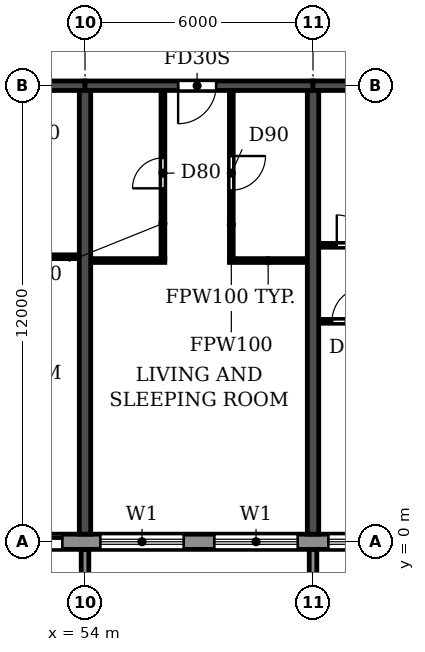
"""IFC4 building model, lengths in metres.
Left out: names, types, materials, properties, quantities, classifications, styles, units other than length and angle.
Written with IfcOpenShell. Run it as: python <this file> out.ifc"""

import sys

from ifc_helpers import new_model, si_unit, direction, frame, frame_2d, origin, place, context, subcontext, project, spatial, polyline, rectangle, outline, extrude, source, transform, mapped, element, fill, save


model = new_model("IFC4")
c1 = context("Model", 3, precision=1e-05, world=origin(), true_north=direction((0.0, 1.0)))
c2 = subcontext(c1, "Body", "Model", "MODEL_VIEW")
j1 = project(units=[si_unit("LENGTHUNIT", "METRE"), si_unit("PLANEANGLEUNIT", "RADIAN")], contexts=[c1])
p1 = place(None, origin())
s1 = spatial("IfcSite", under=j1, at=p1, CompositionType="ELEMENT")
p2 = place(p1, origin())
s2 = spatial("IfcBuilding", under=s1, at=p2, CompositionType="ELEMENT")
p3 = place(p2, frame((0.0, 0.0, 142.2)))
s3 = spatial("IfcBuildingStorey", under=s2, at=p3, CompositionType="ELEMENT", Elevation=142.2)
for number, where, z_axis, x_axis in (
    (1, (54.0, 0.2, 0.0), (0.0, 0.0, 1.0), (0.0, 1.0, 0.0)),
    (2, (60.0, 0.2, 0.0), (0.0, 0.0, 1.0), (0.0, 1.0, 0.0)),
):
    element("IfcWall", number, at=place(p3, frame(where, z_axis=z_axis, x_axis=x_axis)), inside=s3, PredefinedType="SHEAR", context=c2, shape_type="SweptSolid", body=[
        extrude(rectangle(XDim=11.675, YDim=0.3, at=frame_2d((5.837, 0.0))), origin(), (0.0, 0.0, 1.0), 3.07),
    ])
p4 = place(p3, frame((48.0, 12.0, 0.0), z_axis=(0.0, 0.0, 1.0), x_axis=(1.0, 0.0, 0.0)))
e3 = element("IfcWall", 3, at=p4, inside=s3, PredefinedType="SHEAR", context=c2, shape_type="SweptSolid", body=[
    extrude(rectangle(XDim=6.0, YDim=0.25, at=frame_2d((3.0, 0.0))), origin(), (0.0, 0.0, 1.0), 2.47),
])
p5 = place(p4, frame((2.45, 0.0, 0.0)))
e4 = element("IfcOpeningElement", 4, at=p5, cuts=e3, PredefinedType="OPENING", context=c2, shape_type="SweptSolid", body=[
    extrude(rectangle(XDim=1.0, YDim=2.1, at=frame_2d((0.5, 1.05))), frame((0.0, 0.135, 0.0), z_axis=(0.0, -1.0, 0.0), x_axis=(1.0, 0.0, 0.0)), (0.0, 0.0, 1.0), 0.27),
])
p6 = place(p3, frame((54.0, 12.0, 0.0), z_axis=(0.0, 0.0, 1.0), x_axis=(1.0, 0.0, 0.0)))
e5 = element("IfcWall", 5, at=p6, inside=s3, PredefinedType="SHEAR", context=c2, shape_type="SweptSolid", body=[
    extrude(rectangle(XDim=6.0, YDim=0.25, at=frame_2d((3.0, 0.0))), origin(), (0.0, 0.0, 1.0), 2.47),
])
p7 = place(p6, frame((2.45, 0.0, 0.0)))
e6 = element("IfcOpeningElement", 6, at=p7, cuts=e5, PredefinedType="OPENING", context=c2, shape_type="SweptSolid", body=[
    extrude(rectangle(XDim=1.0, YDim=2.1, at=frame_2d((0.5, 1.05))), frame((0.0, 0.135, 0.0), z_axis=(0.0, -1.0, 0.0), x_axis=(1.0, 0.0, 0.0)), (0.0, 0.0, 1.0), 0.27),
])
p8 = place(p3, frame((60.0, 12.0, 0.0), z_axis=(0.0, 0.0, 1.0), x_axis=(1.0, 0.0, 0.0)))
e7 = element("IfcWall", 7, at=p8, inside=s3, PredefinedType="SHEAR", context=c2, shape_type="SweptSolid", body=[
    extrude(rectangle(XDim=6.0, YDim=0.25, at=frame_2d((3.0, 0.0))), origin(), (0.0, 0.0, 1.0), 2.47),
])
p9 = place(p8, frame((2.45, 0.0, 0.0)))
e8 = element("IfcOpeningElement", 8, at=p9, cuts=e7, PredefinedType="OPENING", context=c2, shape_type="SweptSolid", body=[
    extrude(rectangle(XDim=1.0, YDim=2.1, at=frame_2d((0.5, 1.05))), frame((0.0, 0.135, 0.0), z_axis=(0.0, -1.0, 0.0), x_axis=(1.0, 0.0, 0.0)), (0.0, 0.0, 1.0), 0.27),
])
p10 = place(p3, frame((16.683, 0.0, 0.0), z_axis=(0.0, 0.0, 1.0), x_axis=(1.0, 0.0, 0.0)))
e9 = element("IfcWall", 9, at=p10, inside=s3, PredefinedType="STANDARD", context=c2, shape_type="SweptSolid", body=[
    extrude(rectangle(XDim=68.634, YDim=0.4, at=frame_2d((34.317, 0.0))), origin(), (0.0, 0.0, 1.0), 3.07),
])
p11 = place(p10, frame((1.717, 0.0, 0.9)))
e10 = element("IfcOpeningElement", 10, at=p11, cuts=e9, PredefinedType="OPENING", context=c2, shape_type="SweptSolid", body=[
    extrude(rectangle(XDim=2.2, YDim=1.5, at=frame_2d((1.1, 0.75))), frame((0.0, 0.21, 0.0), z_axis=(0.0, -1.0, 0.0), x_axis=(1.0, 0.0, 0.0)), (0.0, 0.0, 1.0), 0.42),
])
p12 = place(p10, frame((4.717, 0.0, 0.9)))
e11 = element("IfcOpeningElement", 11, at=p12, cuts=e9, PredefinedType="OPENING", context=c2, shape_type="SweptSolid", body=[
    extrude(rectangle(XDim=2.2, YDim=1.5, at=frame_2d((1.1, 0.75))), frame((0.0, 0.21, 0.0), z_axis=(0.0, -1.0, 0.0), x_axis=(1.0, 0.0, 0.0)), (0.0, 0.0, 1.0), 0.42),
])
p13 = place(p10, frame((7.717, 0.0, 0.9)))
e12 = element("IfcOpeningElement", 12, at=p13, cuts=e9, PredefinedType="OPENING", context=c2, shape_type="SweptSolid", body=[
    extrude(rectangle(XDim=2.2, YDim=1.5, at=frame_2d((1.1, 0.75))), frame((0.0, 0.21, 0.0), z_axis=(0.0, -1.0, 0.0), x_axis=(1.0, 0.0, 0.0)), (0.0, 0.0, 1.0), 0.42),
])
p14 = place(p10, frame((10.717, 0.0, 0.9)))
e13 = element("IfcOpeningElement", 13, at=p14, cuts=e9, PredefinedType="OPENING", context=c2, shape_type="SweptSolid", body=[
    extrude(rectangle(XDim=2.2, YDim=1.5, at=frame_2d((1.1, 0.75))), frame((0.0, 0.21, 0.0), z_axis=(0.0, -1.0, 0.0), x_axis=(1.0, 0.0, 0.0)), (0.0, 0.0, 1.0), 0.42),
])
p15 = place(p10, frame((13.717, 0.0, 0.9)))
e14 = element("IfcOpeningElement", 14, at=p15, cuts=e9, PredefinedType="OPENING", context=c2, shape_type="SweptSolid", body=[
    extrude(rectangle(XDim=2.2, YDim=1.5, at=frame_2d((1.1, 0.75))), frame((0.0, 0.21, 0.0), z_axis=(0.0, -1.0, 0.0), x_axis=(1.0, 0.0, 0.0)), (0.0, 0.0, 1.0), 0.42),
])
p16 = place(p10, frame((16.717, 0.0, 0.9)))
e15 = element("IfcOpeningElement", 15, at=p16, cuts=e9, PredefinedType="OPENING", context=c2, shape_type="SweptSolid", body=[
    extrude(rectangle(XDim=2.2, YDim=1.5, at=frame_2d((1.1, 0.75))), frame((0.0, 0.21, 0.0), z_axis=(0.0, -1.0, 0.0), x_axis=(1.0, 0.0, 0.0)), (0.0, 0.0, 1.0), 0.42),
])
p17 = place(p10, frame((19.717, 0.0, 0.9)))
e16 = element("IfcOpeningElement", 16, at=p17, cuts=e9, PredefinedType="OPENING", context=c2, shape_type="SweptSolid", body=[
    extrude(rectangle(XDim=2.2, YDim=1.5, at=frame_2d((1.1, 0.75))), frame((0.0, 0.21, 0.0), z_axis=(0.0, -1.0, 0.0), x_axis=(1.0, 0.0, 0.0)), (0.0, 0.0, 1.0), 0.42),
])
p18 = place(p10, frame((22.717, 0.0, 0.9)))
e17 = element("IfcOpeningElement", 17, at=p18, cuts=e9, PredefinedType="OPENING", context=c2, shape_type="SweptSolid", body=[
    extrude(rectangle(XDim=2.2, YDim=1.5, at=frame_2d((1.1, 0.75))), frame((0.0, 0.21, 0.0), z_axis=(0.0, -1.0, 0.0), x_axis=(1.0, 0.0, 0.0)), (0.0, 0.0, 1.0), 0.42),
])
p19 = place(p10, frame((25.717, 0.0, 0.9)))
e18 = element("IfcOpeningElement", 18, at=p19, cuts=e9, PredefinedType="OPENING", context=c2, shape_type="SweptSolid", body=[
    extrude(rectangle(XDim=2.2, YDim=1.5, at=frame_2d((1.1, 0.75))), frame((0.0, 0.21, 0.0), z_axis=(0.0, -1.0, 0.0), x_axis=(1.0, 0.0, 0.0)), (0.0, 0.0, 1.0), 0.42),
])
p20 = place(p10, frame((28.717, 0.0, 0.9)))
e19 = element("IfcOpeningElement", 19, at=p20, cuts=e9, PredefinedType="OPENING", context=c2, shape_type="SweptSolid", body=[
    extrude(rectangle(XDim=2.2, YDim=1.5, at=frame_2d((1.1, 0.75))), frame((0.0, 0.21, 0.0), z_axis=(0.0, -1.0, 0.0), x_axis=(1.0, 0.0, 0.0)), (0.0, 0.0, 1.0), 0.42),
])
p21 = place(p10, frame((31.717, 0.0, 0.9)))
e20 = element("IfcOpeningElement", 20, at=p21, cuts=e9, PredefinedType="OPENING", context=c2, shape_type="SweptSolid", body=[
    extrude(rectangle(XDim=2.2, YDim=1.5, at=frame_2d((1.1, 0.75))), frame((0.0, 0.21, 0.0), z_axis=(0.0, -1.0, 0.0), x_axis=(1.0, 0.0, 0.0)), (0.0, 0.0, 1.0), 0.42),
])
p22 = place(p10, frame((34.917, 0.0, 0.0)))
e21 = element("IfcOpeningElement", 21, at=p22, cuts=e9, PredefinedType="OPENING", context=c2, shape_type="SweptSolid", body=[
    extrude(rectangle(XDim=1.8, YDim=2.4, at=frame_2d((0.9, 1.2))), frame((0.0, 0.21, 0.0), z_axis=(0.0, -1.0, 0.0), x_axis=(1.0, 0.0, 0.0)), (0.0, 0.0, 1.0), 0.42),
])
p23 = place(p10, frame((37.717, 0.0, 0.9)))
e22 = element("IfcOpeningElement", 22, at=p23, cuts=e9, PredefinedType="OPENING", context=c2, shape_type="SweptSolid", body=[
    extrude(rectangle(XDim=2.2, YDim=1.5, at=frame_2d((1.1, 0.75))), frame((0.0, 0.21, 0.0), z_axis=(0.0, -1.0, 0.0), x_axis=(1.0, 0.0, 0.0)), (0.0, 0.0, 1.0), 0.42),
])
p24 = place(p10, frame((40.717, 0.0, 0.9)))
e23 = element("IfcOpeningElement", 23, at=p24, cuts=e9, PredefinedType="OPENING", context=c2, shape_type="SweptSolid", body=[
    extrude(rectangle(XDim=2.2, YDim=1.5, at=frame_2d((1.1, 0.75))), frame((0.0, 0.21, 0.0), z_axis=(0.0, -1.0, 0.0), x_axis=(1.0, 0.0, 0.0)), (0.0, 0.0, 1.0), 0.42),
])
p25 = place(p10, frame((43.717, 0.0, 0.9)))
e24 = element("IfcOpeningElement", 24, at=p25, cuts=e9, PredefinedType="OPENING", context=c2, shape_type="SweptSolid", body=[
    extrude(rectangle(XDim=2.2, YDim=1.5, at=frame_2d((1.1, 0.75))), frame((0.0, 0.21, 0.0), z_axis=(0.0, -1.0, 0.0), x_axis=(1.0, 0.0, 0.0)), (0.0, 0.0, 1.0), 0.42),
])
p26 = place(p10, frame((46.917, 0.0, 0.0)))
e25 = element("IfcOpeningElement", 25, at=p26, cuts=e9, PredefinedType="OPENING", context=c2, shape_type="SweptSolid", body=[
    extrude(rectangle(XDim=1.8, YDim=2.4, at=frame_2d((0.9, 1.2))), frame((0.0, 0.21, 0.0), z_axis=(0.0, -1.0, 0.0), x_axis=(1.0, 0.0, 0.0)), (0.0, 0.0, 1.0), 0.42),
])
p27 = place(p10, frame((49.717, 0.0, 0.9)))
e26 = element("IfcOpeningElement", 26, at=p27, cuts=e9, PredefinedType="OPENING", context=c2, shape_type="SweptSolid", body=[
    extrude(rectangle(XDim=2.2, YDim=1.5, at=frame_2d((1.1, 0.75))), frame((0.0, 0.21, 0.0), z_axis=(0.0, -1.0, 0.0), x_axis=(1.0, 0.0, 0.0)), (0.0, 0.0, 1.0), 0.42),
])
p28 = place(p10, frame((52.717, 0.0, 0.9)))
e27 = element("IfcOpeningElement", 27, at=p28, cuts=e9, PredefinedType="OPENING", context=c2, shape_type="SweptSolid", body=[
    extrude(rectangle(XDim=2.2, YDim=1.5, at=frame_2d((1.1, 0.75))), frame((0.0, 0.21, 0.0), z_axis=(0.0, -1.0, 0.0), x_axis=(1.0, 0.0, 0.0)), (0.0, 0.0, 1.0), 0.42),
])
p29 = place(p10, frame((55.717, 0.0, 0.9)))
e28 = element("IfcOpeningElement", 28, at=p29, cuts=e9, PredefinedType="OPENING", context=c2, shape_type="SweptSolid", body=[
    extrude(rectangle(XDim=2.2, YDim=1.5, at=frame_2d((1.1, 0.75))), frame((0.0, 0.21, 0.0), z_axis=(0.0, -1.0, 0.0), x_axis=(1.0, 0.0, 0.0)), (0.0, 0.0, 1.0), 0.42),
])
p30 = place(p10, frame((58.717, 0.0, 0.9)))
e29 = element("IfcOpeningElement", 29, at=p30, cuts=e9, PredefinedType="OPENING", context=c2, shape_type="SweptSolid", body=[
    extrude(rectangle(XDim=2.2, YDim=1.5, at=frame_2d((1.1, 0.75))), frame((0.0, 0.21, 0.0), z_axis=(0.0, -1.0, 0.0), x_axis=(1.0, 0.0, 0.0)), (0.0, 0.0, 1.0), 0.42),
])
p31 = place(p10, frame((61.717, 0.0, 0.9)))
e30 = element("IfcOpeningElement", 30, at=p31, cuts=e9, PredefinedType="OPENING", context=c2, shape_type="SweptSolid", body=[
    extrude(rectangle(XDim=2.2, YDim=1.5, at=frame_2d((1.1, 0.75))), frame((0.0, 0.21, 0.0), z_axis=(0.0, -1.0, 0.0), x_axis=(1.0, 0.0, 0.0)), (0.0, 0.0, 1.0), 0.42),
])
p32 = place(p10, frame((64.717, 0.0, 0.9)))
e31 = element("IfcOpeningElement", 31, at=p32, cuts=e9, PredefinedType="OPENING", context=c2, shape_type="SweptSolid", body=[
    extrude(rectangle(XDim=2.2, YDim=1.5, at=frame_2d((1.1, 0.75))), frame((0.0, 0.21, 0.0), z_axis=(0.0, -1.0, 0.0), x_axis=(1.0, 0.0, 0.0)), (0.0, 0.0, 1.0), 0.42),
])
m1 = source(origin(), c2, "Body", "SweptSolid", [
    extrude(outline(polyline([(0.0, 0.0), (0.2, 0.0), (0.2, 1.65), (0.0, 1.65), (0.0, 0.0)])), origin(), (0.0, 0.0, 1.0), 3.1),
])
for number, where in (
    (32, (53.9, -1.85, 0.0)),
    (33, (59.9, -1.85, 0.0)),
):
    element("IfcWall", number, at=place(p3, frame(where)), inside=s3, PredefinedType="STANDARD", context=c2, shape_type="MappedRepresentation", body=[
        mapped(m1, transform((0.0, 0.0, 0.0))),
    ])
p33 = place(p3, frame((60.16, 5.8, 0.0), z_axis=(0.0, 0.0, 1.0), x_axis=(1.0, 0.0, 0.0)))
e34 = element("IfcWall", 34, at=p33, inside=s3, PredefinedType="PARTITIONING", context=c2, shape_type="SweptSolid", body=[
    extrude(rectangle(XDim=2.89, YDim=0.1, at=frame_2d((1.445, 0.0))), origin(), (0.0, 0.0, 1.0), 3.07),
])
p34 = place(p33, frame((0.34, 0.0, 0.0)))
e35 = element("IfcOpeningElement", 35, at=p34, cuts=e34, PredefinedType="OPENING", context=c2, shape_type="SweptSolid", body=[
    extrude(rectangle(XDim=0.9, YDim=2.1, at=frame_2d((0.45, 1.05))), frame((0.0, 0.06, 0.0), z_axis=(0.0, -1.0, 0.0), x_axis=(1.0, 0.0, 0.0)), (0.0, 0.0, 1.0), 0.12),
])
p35 = place(p3, frame((54.16, 7.4, 0.0), z_axis=(0.0, 0.0, 1.0), x_axis=(1.0, 0.0, 0.0)))
e36 = element("IfcWall", 36, at=p35, inside=s3, PredefinedType="PARTITIONING", context=c2, shape_type="SweptSolid", body=[
    extrude(rectangle(XDim=1.94, YDim=0.1, at=frame_2d((0.97, 0.0))), origin(), (0.0, 0.0, 1.0), 3.07),
])
for number, where, z_axis, x_axis in (
    (37, (57.8, 7.4, 0.0), (0.0, 0.0, 1.0), (1.0, 0.0, 0.0)),
    (38, (51.8, 7.5, 0.0), (0.0, 0.0, 1.0), (1.0, 0.0, 0.0)),
):
    element("IfcWall", number, at=place(p3, frame(where, z_axis=z_axis, x_axis=x_axis)), inside=s3, PredefinedType="PARTITIONING", context=c2, shape_type="SweptSolid", body=[
        extrude(rectangle(XDim=2.04, YDim=0.1, at=frame_2d((1.02, 0.0))), origin(), (0.0, 0.0, 1.0), 3.07),
    ])
p36 = place(p3, frame((60.16, 7.8, 0.0), z_axis=(0.0, 0.0, 1.0), x_axis=(1.0, 0.0, 0.0)))
e39 = element("IfcWall", 39, at=p36, inside=s3, PredefinedType="PARTITIONING", context=c2, shape_type="SweptSolid", body=[
    extrude(rectangle(XDim=1.94, YDim=0.1, at=frame_2d((0.97, 0.0))), origin(), (0.0, 0.0, 1.0), 3.07),
])
p37 = place(p36, frame((0.465, 0.0, 0.0)))
e40 = element("IfcOpeningElement", 40, at=p37, cuts=e39, PredefinedType="OPENING", context=c2, shape_type="SweptSolid", body=[
    extrude(rectangle(XDim=0.8, YDim=2.1, at=frame_2d((0.4, 1.05))), frame((0.0, 0.06, 0.0), z_axis=(0.0, -1.0, 0.0), x_axis=(1.0, 0.0, 0.0)), (0.0, 0.0, 1.0), 0.12),
])
p38 = place(p3, frame((56.05, 7.45, 0.0), z_axis=(0.0, 0.0, 1.0), x_axis=(0.0, 1.0, 0.0)))
e41 = element("IfcWall", 41, at=p38, inside=s3, PredefinedType="PARTITIONING", context=c2, shape_type="SweptSolid", body=[
    extrude(rectangle(XDim=4.415, YDim=0.1, at=frame_2d((2.208, 0.0))), origin(), (0.0, 0.0, 1.0), 3.07),
])
p39 = place(p38, frame((1.85, 0.0, 0.0)))
e42 = element("IfcOpeningElement", 42, at=p39, cuts=e41, PredefinedType="OPENING", context=c2, shape_type="SweptSolid", body=[
    extrude(rectangle(XDim=0.8, YDim=2.1, at=frame_2d((0.4, 1.05))), frame((0.0, 0.06, 0.0), z_axis=(0.0, -1.0, 0.0), x_axis=(1.0, 0.0, 0.0)), (0.0, 0.0, 1.0), 0.12),
])
p40 = place(p3, frame((57.85, 7.45, 0.0), z_axis=(0.0, 0.0, 1.0), x_axis=(0.0, 1.0, 0.0)))
e43 = element("IfcWall", 43, at=p40, inside=s3, PredefinedType="PARTITIONING", context=c2, shape_type="SweptSolid", body=[
    extrude(rectangle(XDim=4.415, YDim=0.1, at=frame_2d((2.208, 0.0))), origin(), (0.0, 0.0, 1.0), 3.07),
])
p41 = place(p40, frame((1.8, 0.0, 0.0)))
e44 = element("IfcOpeningElement", 44, at=p41, cuts=e43, PredefinedType="OPENING", context=c2, shape_type="SweptSolid", body=[
    extrude(rectangle(XDim=0.9, YDim=2.1, at=frame_2d((0.45, 1.05))), frame((0.0, 0.06, 0.0), z_axis=(0.0, -1.0, 0.0), x_axis=(1.0, 0.0, 0.0)), (0.0, 0.0, 1.0), 0.12),
])
p42 = place(p22, origin())
e45 = element("IfcDoor", 45, at=p42, inside=s3, OperationType="DOUBLE_DOOR_SLIDING", PredefinedType="DOOR", context=c2, shape_type="SweptSolid", body=[
    extrude(rectangle(XDim=1.8, YDim=2.4, at=frame_2d((0.9, 1.2))), frame((0.0, 0.025, 0.0), z_axis=(0.0, -1.0, 0.0), x_axis=(1.0, 0.0, 0.0)), (0.0, 0.0, 1.0), 0.05),
])
fill(e21, e45)
p43 = place(p23, origin())
e46 = element("IfcWindow", 46, at=p43, inside=s3, PartitioningType="DOUBLE_PANEL_HORIZONTAL", PredefinedType="WINDOW", context=c2, shape_type="SweptSolid", body=[
    extrude(rectangle(XDim=2.2, YDim=1.5, at=frame_2d((1.1, 0.75))), frame((0.0, 0.03, 0.0), z_axis=(0.0, -1.0, 0.0), x_axis=(1.0, 0.0, 0.0)), (0.0, 0.0, 1.0), 0.06),
])
fill(e22, e46)
p44 = place(p24, origin())
e47 = element("IfcWindow", 47, at=p44, inside=s3, PartitioningType="DOUBLE_PANEL_HORIZONTAL", PredefinedType="WINDOW", context=c2, shape_type="SweptSolid", body=[
    extrude(rectangle(XDim=2.2, YDim=1.5, at=frame_2d((1.1, 0.75))), frame((0.0, 0.03, 0.0), z_axis=(0.0, -1.0, 0.0), x_axis=(1.0, 0.0, 0.0)), (0.0, 0.0, 1.0), 0.06),
])
fill(e23, e47)
p45 = place(p25, origin())
e48 = element("IfcWindow", 48, at=p45, inside=s3, PartitioningType="DOUBLE_PANEL_HORIZONTAL", PredefinedType="WINDOW", context=c2, shape_type="SweptSolid", body=[
    extrude(rectangle(XDim=2.2, YDim=1.5, at=frame_2d((1.1, 0.75))), frame((0.0, 0.03, 0.0), z_axis=(0.0, -1.0, 0.0), x_axis=(1.0, 0.0, 0.0)), (0.0, 0.0, 1.0), 0.06),
])
fill(e24, e48)
p46 = place(p39, origin())
e49 = element("IfcDoor", 49, at=p46, inside=s3, OperationType="SINGLE_SWING_LEFT", PredefinedType="DOOR", context=c2, shape_type="SweptSolid", body=[
    extrude(rectangle(XDim=0.8, YDim=2.1, at=frame_2d((0.4, 1.05))), frame((0.0, 0.025, 0.0), z_axis=(0.0, -1.0, 0.0), x_axis=(1.0, 0.0, 0.0)), (0.0, 0.0, 1.0), 0.05),
])
fill(e42, e49)
p47 = place(p7, frame((1.0, 0.0, 0.0), z_axis=(0.0, 0.0, 1.0), x_axis=(-1.0, 0.0, 0.0)))
e50 = element("IfcDoor", 50, at=p47, inside=s3, OperationType="SINGLE_SWING_RIGHT", PredefinedType="DOOR", context=c2, shape_type="SweptSolid", body=[
    extrude(rectangle(XDim=1.0, YDim=2.1, at=frame_2d((0.5, 1.05))), frame((0.0, 0.025, 0.0), z_axis=(0.0, -1.0, 0.0), x_axis=(1.0, 0.0, 0.0)), (0.0, 0.0, 1.0), 0.05),
])
fill(e6, e50)
p48 = place(p41, frame((0.9, 0.0, 0.0), z_axis=(0.0, 0.0, 1.0), x_axis=(-1.0, 0.0, 0.0)))
e51 = element("IfcDoor", 51, at=p48, inside=s3, OperationType="SINGLE_SWING_LEFT", PredefinedType="DOOR", context=c2, shape_type="SweptSolid", body=[
    extrude(rectangle(XDim=0.9, YDim=2.1, at=frame_2d((0.45, 1.05))), frame((0.0, 0.025, 0.0), z_axis=(0.0, -1.0, 0.0), x_axis=(1.0, 0.0, 0.0)), (0.0, 0.0, 1.0), 0.05),
])
fill(e44, e51)
p49 = place(p34, origin())
e52 = element("IfcDoor", 52, at=p49, inside=s3, OperationType="SINGLE_SWING_RIGHT", PredefinedType="DOOR", context=c2, shape_type="SweptSolid", body=[
    extrude(rectangle(XDim=0.9, YDim=2.1, at=frame_2d((0.45, 1.05))), frame((0.0, 0.025, 0.0), z_axis=(0.0, -1.0, 0.0), x_axis=(1.0, 0.0, 0.0)), (0.0, 0.0, 1.0), 0.05),
])
fill(e35, e52)
p50 = place(p37, origin())
e53 = element("IfcDoor", 53, at=p50, inside=s3, OperationType="SINGLE_SWING_LEFT", PredefinedType="DOOR", context=c2, shape_type="SweptSolid", body=[
    extrude(rectangle(XDim=0.8, YDim=2.1, at=frame_2d((0.4, 1.05))), frame((0.0, 0.025, 0.0), z_axis=(0.0, -1.0, 0.0), x_axis=(1.0, 0.0, 0.0)), (0.0, 0.0, 1.0), 0.05),
])
fill(e40, e53)
save(model, sys.argv[1])
